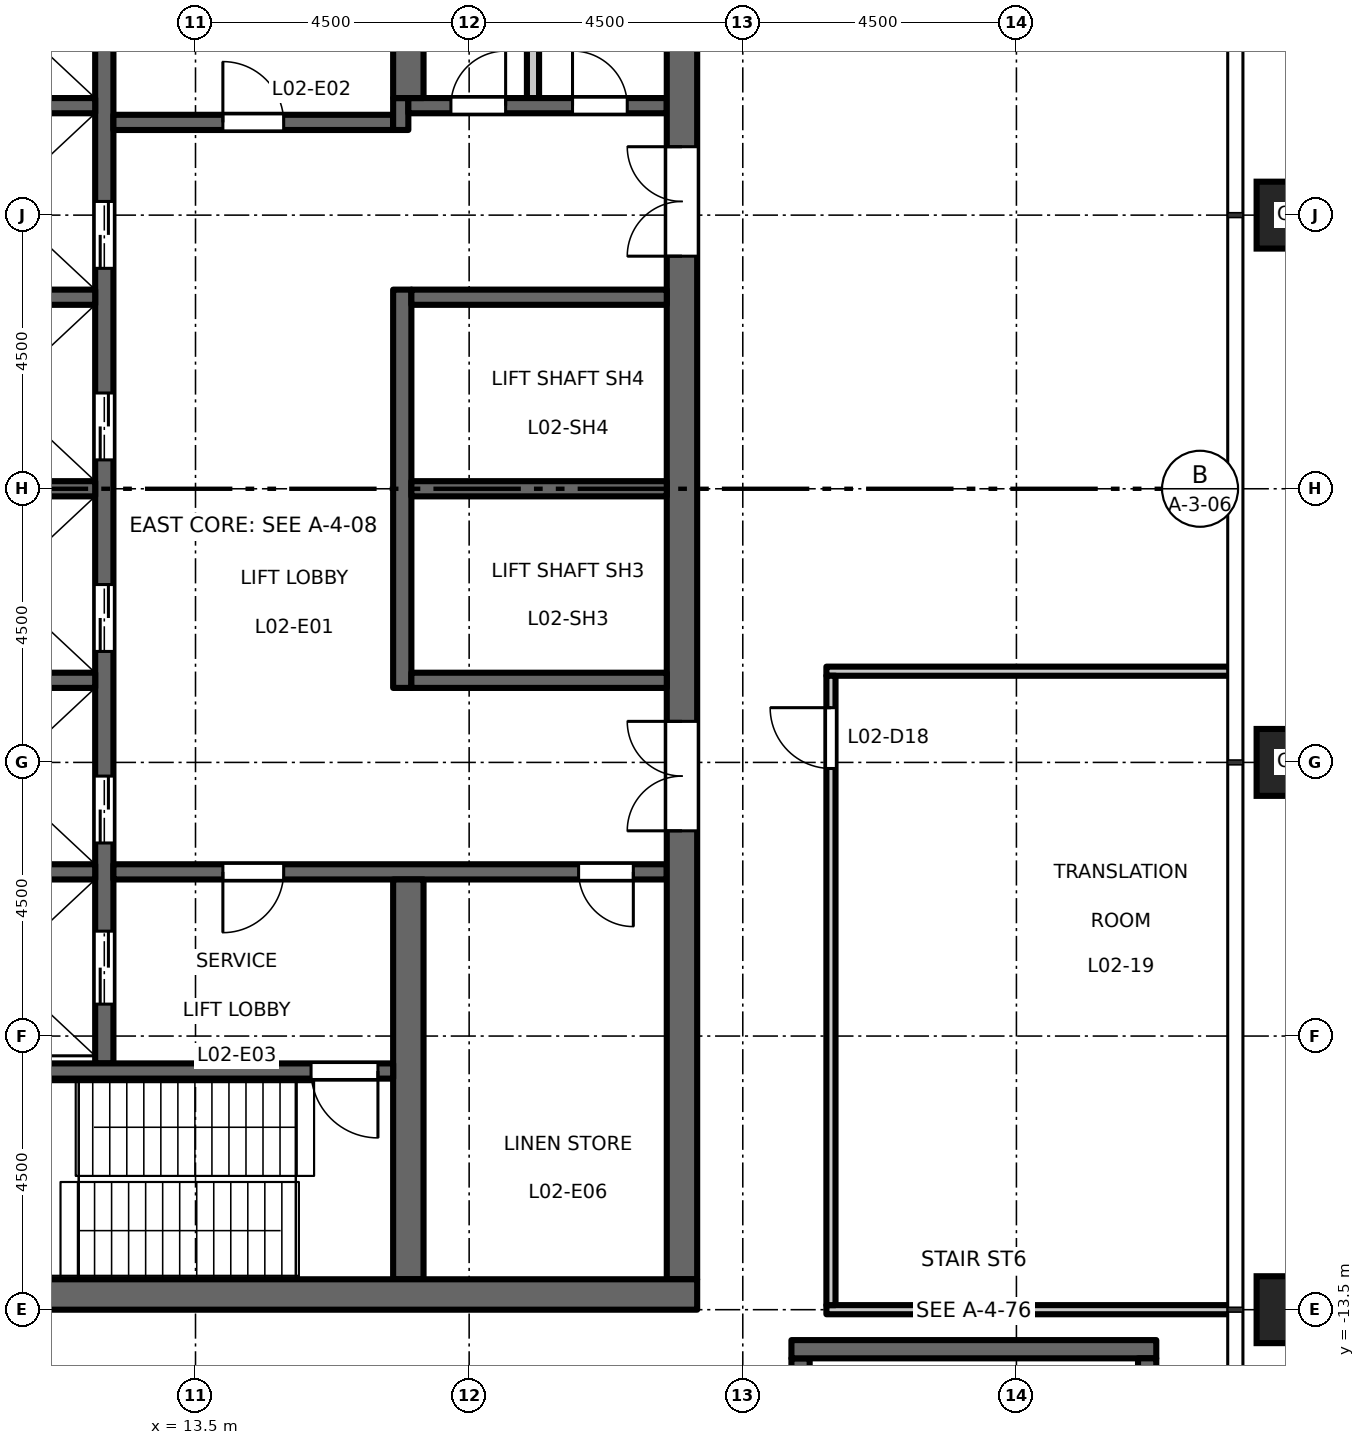
"""IFC4 building model, lengths in metres.
Left out: names, types, materials, properties, quantities, classifications, styles, units other than length and angle.
Written with IfcOpenShell. Run it as: python <this file> out.ifc"""

import sys

from ifc_helpers import new_model, si_unit, direction, frame, frame_2d, origin, origin_2d, place, context, subcontext, project, spatial, rectangle, hollow_rectangle, extrude, element, fill, save


model = new_model("IFC4")
c1 = context("Model", 3, precision=1e-05, world=origin(), true_north=direction((0.0, 1.0)))
c2 = subcontext(c1, "Body", "Model", "MODEL_VIEW")
j1 = project(units=[si_unit("LENGTHUNIT", "METRE"), si_unit("PLANEANGLEUNIT", "RADIAN")], contexts=[c1])
p1 = place(None, origin())
s1 = spatial("IfcSite", under=j1, at=p1, CompositionType="ELEMENT")
p2 = place(p1, origin())
s2 = spatial("IfcBuilding", under=s1, at=p2, CompositionType="ELEMENT")
p3 = place(p2, frame((0.0, 0.0, 12.2)))
s3 = spatial("IfcBuildingStorey", under=s2, at=p3, CompositionType="ELEMENT", Elevation=12.2)
for number, where, z_axis, x_axis in (
    (1, (31.5, -13.5, 0.0), (0.0, 0.0, 1.0), (1.0, 0.0, 0.0)),
    (2, (31.5, -4.5, 0.0), (0.0, 0.0, 1.0), (1.0, 0.0, 0.0)),
    (3, (31.5, 4.5, 0.0), (0.0, 0.0, 1.0), (1.0, 0.0, 0.0)),
):
    element("IfcColumn", number, at=place(p3, frame(where, z_axis=z_axis, x_axis=x_axis)), inside=s3, PredefinedType="COLUMN", context=c2, shape_type="SweptSolid", body=[
        extrude(hollow_rectangle(XDim=1.1, YDim=1.1, WallThickness=0.07, at=origin_2d()), origin(), (0.0, 0.0, 1.0), 5.0),
    ])
p4 = place(p3, frame((12.0, -9.45, 0.0), z_axis=(0.0, 0.0, 1.0), x_axis=(0.0, 1.0, 0.0)))
e4 = element("IfcWall", 4, at=p4, inside=s3, PredefinedType="SHEAR", context=c2, shape_type="SweptSolid", body=[
    extrude(rectangle(XDim=18.9, YDim=0.3, at=frame_2d((9.45, 0.0))), origin(), (0.0, 0.0, 1.0), 4.85),
])
p5 = place(p4, frame((3.625, 0.0, 0.0)))
e5 = element("IfcOpeningElement", 5, at=p5, cuts=e4, PredefinedType="OPENING", context=c2, shape_type="SweptSolid", body=[
    extrude(rectangle(XDim=1.1, YDim=2.1, at=frame_2d((0.55, 1.05))), frame((0.0, 0.16, 0.0), z_axis=(0.0, -1.0, 0.0), x_axis=(1.0, 0.0, 0.0)), (0.0, 0.0, 1.0), 0.32),
])
p6 = place(p4, frame((6.775, 0.0, 0.0)))
e6 = element("IfcOpeningElement", 6, at=p6, cuts=e4, PredefinedType="OPENING", context=c2, shape_type="SweptSolid", body=[
    extrude(rectangle(XDim=1.1, YDim=2.1, at=frame_2d((0.55, 1.05))), frame((0.0, 0.16, 0.0), z_axis=(0.0, -1.0, 0.0), x_axis=(1.0, 0.0, 0.0)), (0.0, 0.0, 1.0), 0.32),
])
p7 = place(p4, frame((9.925, 0.0, 0.0)))
e7 = element("IfcOpeningElement", 7, at=p7, cuts=e4, PredefinedType="OPENING", context=c2, shape_type="SweptSolid", body=[
    extrude(rectangle(XDim=1.1, YDim=2.1, at=frame_2d((0.55, 1.05))), frame((0.0, 0.16, 0.0), z_axis=(0.0, -1.0, 0.0), x_axis=(1.0, 0.0, 0.0)), (0.0, 0.0, 1.0), 0.32),
])
p8 = place(p4, frame((13.075, 0.0, 0.0)))
e8 = element("IfcOpeningElement", 8, at=p8, cuts=e4, PredefinedType="OPENING", context=c2, shape_type="SweptSolid", body=[
    extrude(rectangle(XDim=1.1, YDim=2.1, at=frame_2d((0.55, 1.05))), frame((0.0, 0.16, 0.0), z_axis=(0.0, -1.0, 0.0), x_axis=(1.0, 0.0, 0.0)), (0.0, 0.0, 1.0), 0.32),
])
p9 = place(p4, frame((16.725, 0.0, 0.0)))
e9 = element("IfcOpeningElement", 9, at=p9, cuts=e4, PredefinedType="OPENING", context=c2, shape_type="SweptSolid", body=[
    extrude(rectangle(XDim=1.2, YDim=2.1, at=frame_2d((0.6, 1.05))), frame((0.0, 0.16, 0.0), z_axis=(0.0, -1.0, 0.0), x_axis=(1.0, 0.0, 0.0)), (0.0, 0.0, 1.0), 0.32),
])
p10 = place(p4, frame((0.975, 0.0, 0.0)))
e10 = element("IfcOpeningElement", 10, at=p10, cuts=e4, PredefinedType="OPENING", context=c2, shape_type="SweptSolid", body=[
    extrude(rectangle(XDim=1.2, YDim=2.1, at=frame_2d((0.6, 1.05))), frame((0.0, 0.16, 0.0), z_axis=(0.0, -1.0, 0.0), x_axis=(1.0, 0.0, 0.0)), (0.0, 0.0, 1.0), 0.32),
])
p11 = place(p3, frame((12.15, 6.025, 0.0), z_axis=(0.0, 0.0, 1.0), x_axis=(1.0, 0.0, 0.0)))
e11 = element("IfcWall", 11, at=p11, inside=s3, PredefinedType="SHEAR", context=c2, shape_type="SweptSolid", body=[
    extrude(rectangle(XDim=4.6, YDim=0.25, at=frame_2d((2.3, 0.0))), origin(), (0.0, 0.0, 1.0), 4.85),
])
p12 = place(p11, frame((1.8, 0.0, 0.0)))
e12 = element("IfcOpeningElement", 12, at=p12, cuts=e11, PredefinedType="OPENING", context=c2, shape_type="SweptSolid", body=[
    extrude(rectangle(XDim=1.0, YDim=2.1, at=frame_2d((0.5, 1.05))), frame((0.0, 0.135, 0.0), z_axis=(0.0, -1.0, 0.0), x_axis=(1.0, 0.0, 0.0)), (0.0, 0.0, 1.0), 0.27),
])
p13 = place(p3, frame((16.875, 5.9, 0.0), z_axis=(0.0, 0.0, 1.0), x_axis=(0.0, 1.0, 0.0)))
e13 = element("IfcWall", 13, at=p13, inside=s3, PredefinedType="SHEAR", context=c2, shape_type="SweptSolid", body=[
    extrude(rectangle(XDim=0.525, YDim=0.25, at=frame_2d((0.263, 0.0))), origin(), (0.0, 0.0, 1.0), 4.85),
])
p14 = place(p3, frame((17.0, 6.3, 0.0), z_axis=(0.0, 0.0, 1.0), x_axis=(1.0, 0.0, 0.0)))
e14 = element("IfcWall", 14, at=p14, inside=s3, PredefinedType="SHEAR", context=c2, shape_type="SweptSolid", body=[
    extrude(rectangle(XDim=4.25, YDim=0.25, at=frame_2d((2.125, 0.0))), origin(), (0.0, 0.0, 1.0), 4.85),
])
p15 = place(p14, frame((0.7, 0.0, 0.0)))
e15 = element("IfcOpeningElement", 15, at=p15, cuts=e14, PredefinedType="OPENING", context=c2, shape_type="SweptSolid", body=[
    extrude(rectangle(XDim=0.9, YDim=2.1, at=frame_2d((0.45, 1.05))), frame((0.0, 0.135, 0.0), z_axis=(0.0, -1.0, 0.0), x_axis=(1.0, 0.0, 0.0)), (0.0, 0.0, 1.0), 0.27),
])
p16 = place(p14, frame((2.7, 0.0, 0.0)))
e16 = element("IfcOpeningElement", 16, at=p16, cuts=e14, PredefinedType="OPENING", context=c2, shape_type="SweptSolid", body=[
    extrude(rectangle(XDim=0.9, YDim=2.1, at=frame_2d((0.45, 1.05))), frame((0.0, 0.135, 0.0), z_axis=(0.0, -1.0, 0.0), x_axis=(1.0, 0.0, 0.0)), (0.0, 0.0, 1.0), 0.27),
])
p17 = place(p3, frame((12.15, -6.3, 0.0), z_axis=(0.0, 0.0, 1.0), x_axis=(1.0, 0.0, 0.0)))
e17 = element("IfcWall", 17, at=p17, inside=s3, PredefinedType="SHEAR", context=c2, shape_type="SweptSolid", body=[
    extrude(rectangle(XDim=9.1, YDim=0.25, at=frame_2d((4.55, 0.0))), origin(), (0.0, 0.0, 1.0), 4.85),
])
p18 = place(p17, frame((1.8, 0.0, 0.0)))
e18 = element("IfcOpeningElement", 18, at=p18, cuts=e17, PredefinedType="OPENING", context=c2, shape_type="SweptSolid", body=[
    extrude(rectangle(XDim=1.0, YDim=2.1, at=frame_2d((0.5, 1.05))), frame((0.0, 0.135, 0.0), z_axis=(0.0, -1.0, 0.0), x_axis=(1.0, 0.0, 0.0)), (0.0, 0.0, 1.0), 0.27),
])
p19 = place(p17, frame((7.65, 0.0, 0.0)))
e19 = element("IfcOpeningElement", 19, at=p19, cuts=e17, PredefinedType="OPENING", context=c2, shape_type="SweptSolid", body=[
    extrude(rectangle(XDim=0.9, YDim=2.1, at=frame_2d((0.45, 1.05))), frame((0.0, 0.135, 0.0), z_axis=(0.0, -1.0, 0.0), x_axis=(1.0, 0.0, 0.0)), (0.0, 0.0, 1.0), 0.27),
])
p20 = place(p3, frame((21.5, -13.0, 0.0), z_axis=(0.0, 0.0, 1.0), x_axis=(0.0, 1.0, 0.0)))
e20 = element("IfcWall", 20, at=p20, inside=s3, PredefinedType="SHEAR", context=c2, shape_type="SweptSolid", body=[
    extrude(rectangle(XDim=26.0, YDim=0.5, at=frame_2d((13.0, 0.0))), origin(), (0.0, 0.0, 1.0), 4.85),
])
p21 = place(p20, frame((16.825, 0.0, 0.0)))
e21 = element("IfcOpeningElement", 21, at=p21, cuts=e20, PredefinedType="OPENING", context=c2, shape_type="SweptSolid", body=[
    extrude(rectangle(XDim=1.8, YDim=2.1, at=frame_2d((0.9, 1.05))), frame((0.0, 0.26, 0.0), z_axis=(0.0, -1.0, 0.0), x_axis=(1.0, 0.0, 0.0)), (0.0, 0.0, 1.0), 0.52),
])
p22 = place(p20, frame((7.375, 0.0, 0.0)))
e22 = element("IfcOpeningElement", 22, at=p22, cuts=e20, PredefinedType="OPENING", context=c2, shape_type="SweptSolid", body=[
    extrude(rectangle(XDim=1.8, YDim=2.1, at=frame_2d((0.9, 1.05))), frame((0.0, 0.26, 0.0), z_axis=(0.0, -1.0, 0.0), x_axis=(1.0, 0.0, 0.0)), (0.0, 0.0, 1.0), 0.52),
])
p23 = place(p3, frame((19.05, 6.425, 0.0), z_axis=(0.0, 0.0, 1.0), x_axis=(0.0, 1.0, 0.0)))
e23 = element("IfcWall", 23, at=p23, inside=s3, PredefinedType="PARTITIONING", context=c2, shape_type="SweptSolid", body=[
    extrude(rectangle(XDim=6.575, YDim=0.2, at=frame_2d((3.288, 0.0))), origin(), (0.0, 0.0, 1.0), 4.85),
])
p24 = place(p3, frame((16.9, -3.275, 0.0), z_axis=(0.0, 0.0, 1.0), x_axis=(0.0, 1.0, 0.0)))
e24 = element("IfcWall", 24, at=p24, inside=s3, PredefinedType="SHEAR", context=c2, shape_type="SweptSolid", body=[
    extrude(rectangle(XDim=6.55, YDim=0.3, at=frame_2d((3.275, 0.0))), origin(), (0.0, 0.0, 1.0), 4.85),
])
for number, where, z_axis, x_axis in (
    (25, (17.05, 0.0, 0.0), (0.0, 0.0, 1.0), (1.0, 0.0, 0.0)),
    (26, (17.05, 3.15, 0.0), (0.0, 0.0, 1.0), (1.0, 0.0, 0.0)),
    (27, (17.05, -3.15, 0.0), (0.0, 0.0, 1.0), (1.0, 0.0, 0.0)),
):
    element("IfcWall", number, at=place(p3, frame(where, z_axis=z_axis, x_axis=x_axis)), inside=s3, PredefinedType="SHEAR", context=c2, shape_type="SweptSolid", body=[
        extrude(rectangle(XDim=4.2, YDim=0.25, at=frame_2d((2.1, 0.0))), origin(), (0.0, 0.0, 1.0), 4.85),
    ])
for number, where, z_axis, x_axis in (
    (28, (17.0, 6.425, 0.0), (0.0, 0.0, 1.0), (0.0, 1.0, 0.0)),
    (29, (17.0, -13.0, 0.0), (0.0, 0.0, 1.0), (0.0, 1.0, 0.0)),
):
    element("IfcWall", number, at=place(p3, frame(where, z_axis=z_axis, x_axis=x_axis)), inside=s3, PredefinedType="SHEAR", context=c2, shape_type="SweptSolid", body=[
        extrude(rectangle(XDim=6.575, YDim=0.5, at=frame_2d((3.288, 0.0))), origin(), (0.0, 0.0, 1.0), 4.85),
    ])
for number, where, z_axis, x_axis in (
    (30, (8.75, 0.0, 0.0), (0.0, 0.0, 1.0), (1.0, 0.0, 0.0)),
    (31, (8.75, 3.15, 0.0), (0.0, 0.0, 1.0), (1.0, 0.0, 0.0)),
    (32, (8.75, 6.3, 0.0), (0.0, 0.0, 1.0), (1.0, 0.0, 0.0)),
    (33, (8.75, -3.15, 0.0), (0.0, 0.0, 1.0), (1.0, 0.0, 0.0)),
    (34, (8.75, -6.3, 0.0), (0.0, 0.0, 1.0), (1.0, 0.0, 0.0)),
):
    element("IfcWall", number, at=place(p3, frame(where, z_axis=z_axis, x_axis=x_axis)), inside=s3, PredefinedType="SHEAR", context=c2, shape_type="SweptSolid", body=[
        extrude(rectangle(XDim=3.1, YDim=0.25, at=frame_2d((1.55, 0.0))), origin(), (0.0, 0.0, 1.0), 4.85),
    ])
p25 = place(p3, frame((8.75, -9.575, 0.0), z_axis=(0.0, 0.0, 1.0), x_axis=(1.0, 0.0, 0.0)))
e35 = element("IfcWall", 35, at=p25, inside=s3, PredefinedType="SHEAR", context=c2, shape_type="SweptSolid", body=[
    extrude(rectangle(XDim=8.0, YDim=0.25, at=frame_2d((4.0, 0.0))), origin(), (0.0, 0.0, 1.0), 4.85),
])
p26 = place(p25, frame((6.65, 0.0, 0.0)))
e36 = element("IfcOpeningElement", 36, at=p26, cuts=e35, PredefinedType="OPENING", context=c2, shape_type="SweptSolid", body=[
    extrude(rectangle(XDim=1.1, YDim=2.1, at=frame_2d((0.55, 1.05))), frame((0.0, 0.135, 0.0), z_axis=(0.0, -1.0, 0.0), x_axis=(1.0, 0.0, 0.0)), (0.0, 0.0, 1.0), 0.27),
])
p27 = place(p3, frame((8.25, -13.25, 0.0), z_axis=(0.0, 0.0, 1.0), x_axis=(1.0, 0.0, 0.0)))
e37 = element("IfcWall", 37, at=p27, inside=s3, PredefinedType="SHEAR", context=c2, shape_type="SweptSolid", body=[
    extrude(rectangle(XDim=13.5, YDim=0.5, at=frame_2d((6.75, 0.0))), origin(), (0.0, 0.0, 1.0), 4.85),
])
p28 = place(p3, frame((23.45, -14.3, 0.0), z_axis=(0.0, 0.0, 1.0), x_axis=(0.0, -1.0, 0.0)))
e38 = element("IfcWall", 38, at=p28, inside=s3, PredefinedType="SHEAR", context=c2, shape_type="SweptSolid", body=[
    extrude(rectangle(XDim=10.2, YDim=0.3, at=frame_2d((5.1, 0.0))), origin(), (0.0, 0.0, 1.0), 4.85),
])
p29 = place(p28, frame((0.2, 0.0, 0.0)))
e39 = element("IfcOpeningElement", 39, at=p29, cuts=e38, PredefinedType="OPENING", context=c2, shape_type="SweptSolid", body=[
    extrude(rectangle(XDim=1.8, YDim=2.1, at=frame_2d((0.9, 1.05))), frame((0.0, 0.16, 0.0), z_axis=(0.0, -1.0, 0.0), x_axis=(1.0, 0.0, 0.0)), (0.0, 0.0, 1.0), 0.32),
])
p30 = place(p3, frame((29.3, -14.15, 0.0), z_axis=(0.0, 0.0, 1.0), x_axis=(-1.0, 0.0, 0.0)))
e40 = element("IfcWall", 40, at=p30, inside=s3, PredefinedType="SHEAR", context=c2, shape_type="SweptSolid", body=[
    extrude(rectangle(XDim=6.0, YDim=0.3, at=frame_2d((3.0, 0.0))), origin(), (0.0, 0.0, 1.0), 4.85),
])
p31 = place(p3, frame((29.15, -14.3, 0.0), z_axis=(0.0, 0.0, 1.0), x_axis=(0.0, -1.0, 0.0)))
e41 = element("IfcWall", 41, at=p31, inside=s3, PredefinedType="SHEAR", context=c2, shape_type="SweptSolid", body=[
    extrude(rectangle(XDim=10.2, YDim=0.3, at=frame_2d((5.1, 0.0))), origin(), (0.0, 0.0, 1.0), 4.85),
])
p32 = place(p3, frame((23.875, -13.5, 0.0), z_axis=(0.0, 0.0, 1.0), x_axis=(1.0, 0.0, 0.0)))
e42 = element("IfcWall", 42, at=p32, inside=s3, PredefinedType="PARTITIONING", context=c2, shape_type="SweptSolid", body=[
    extrude(rectangle(XDim=6.635, YDim=0.15, at=frame_2d((3.317, 0.0))), origin(), (0.0, 0.0, 1.0), 3.85),
])
p33 = place(p3, frame((23.875, -3.0, 0.0), z_axis=(0.0, 0.0, 1.0), x_axis=(1.0, 0.0, 0.0)))
e43 = element("IfcWall", 43, at=p33, inside=s3, PredefinedType="PARTITIONING", context=c2, shape_type="SweptSolid", body=[
    extrude(rectangle(XDim=6.635, YDim=0.15, at=frame_2d((3.317, 0.0))), origin(), (0.0, 0.0, 1.0), 4.85),
])
p34 = place(p3, frame((23.95, -13.425, 0.0), z_axis=(0.0, 0.0, 1.0), x_axis=(0.0, 1.0, 0.0)))
e44 = element("IfcWall", 44, at=p34, inside=s3, PredefinedType="PARTITIONING", context=c2, shape_type="SweptSolid", body=[
    extrude(rectangle(XDim=10.35, YDim=0.15, at=frame_2d((5.175, 0.0))), origin(), (0.0, 0.0, 1.0), 4.85),
])
p35 = place(p34, frame((8.825, 0.0, 0.0)))
e45 = element("IfcOpeningElement", 45, at=p35, cuts=e44, PredefinedType="OPENING", context=c2, shape_type="SweptSolid", body=[
    extrude(rectangle(XDim=1.0, YDim=2.1, at=frame_2d((0.5, 1.05))), frame((0.0, 0.085, 0.0), z_axis=(0.0, -1.0, 0.0), x_axis=(1.0, 0.0, 0.0)), (0.0, 0.0, 1.0), 0.17),
])
p36 = place(p12, origin())
e46 = element("IfcDoor", 46, at=p36, inside=s3, OperationType="SINGLE_SWING_RIGHT", PredefinedType="DOOR", context=c2, shape_type="SweptSolid", body=[
    extrude(rectangle(XDim=1.0, YDim=2.1, at=frame_2d((0.5, 1.05))), frame((0.0, 0.025, 0.0), z_axis=(0.0, -1.0, 0.0), x_axis=(1.0, 0.0, 0.0)), (0.0, 0.0, 1.0), 0.05),
])
fill(e12, e46)
p37 = place(p18, origin())
e47 = element("IfcDoor", 47, at=p37, inside=s3, OperationType="SINGLE_SWING_LEFT", PredefinedType="DOOR", context=c2, shape_type="SweptSolid", body=[
    extrude(rectangle(XDim=1.0, YDim=2.1, at=frame_2d((0.5, 1.05))), frame((0.0, 0.025, 0.0), z_axis=(0.0, -1.0, 0.0), x_axis=(1.0, 0.0, 0.0)), (0.0, 0.0, 1.0), 0.05),
])
fill(e18, e47)
p38 = place(p26, origin())
e48 = element("IfcDoor", 48, at=p38, inside=s3, OperationType="SINGLE_SWING_RIGHT", PredefinedType="DOOR", context=c2, shape_type="SweptSolid", body=[
    extrude(rectangle(XDim=1.1, YDim=2.1, at=frame_2d((0.55, 1.05))), frame((0.0, 0.025, 0.0), z_axis=(0.0, -1.0, 0.0), x_axis=(1.0, 0.0, 0.0)), (0.0, 0.0, 1.0), 0.05),
])
fill(e36, e48)
p39 = place(p21, origin())
e49 = element("IfcDoor", 49, at=p39, inside=s3, OperationType="DOUBLE_DOOR_DOUBLE_SWING", PredefinedType="DOOR", context=c2, shape_type="SweptSolid", body=[
    extrude(rectangle(XDim=1.8, YDim=2.1, at=frame_2d((0.9, 1.05))), frame((0.0, 0.025, 0.0), z_axis=(0.0, -1.0, 0.0), x_axis=(1.0, 0.0, 0.0)), (0.0, 0.0, 1.0), 0.05),
])
fill(e21, e49)
p40 = place(p22, origin())
e50 = element("IfcDoor", 50, at=p40, inside=s3, OperationType="DOUBLE_DOOR_DOUBLE_SWING", PredefinedType="DOOR", context=c2, shape_type="SweptSolid", body=[
    extrude(rectangle(XDim=1.8, YDim=2.1, at=frame_2d((0.9, 1.05))), frame((0.0, 0.025, 0.0), z_axis=(0.0, -1.0, 0.0), x_axis=(1.0, 0.0, 0.0)), (0.0, 0.0, 1.0), 0.05),
])
fill(e22, e50)
p41 = place(p5, origin())
e51 = element("IfcDoor", 51, at=p41, inside=s3, OperationType="DOUBLE_DOOR_SLIDING", PredefinedType="DOOR", context=c2, shape_type="SweptSolid", body=[
    extrude(rectangle(XDim=1.1, YDim=2.1, at=frame_2d((0.55, 1.05))), frame((0.0, 0.025, 0.0), z_axis=(0.0, -1.0, 0.0), x_axis=(1.0, 0.0, 0.0)), (0.0, 0.0, 1.0), 0.05),
])
fill(e5, e51)
p42 = place(p6, origin())
e52 = element("IfcDoor", 52, at=p42, inside=s3, OperationType="DOUBLE_DOOR_SLIDING", PredefinedType="DOOR", context=c2, shape_type="SweptSolid", body=[
    extrude(rectangle(XDim=1.1, YDim=2.1, at=frame_2d((0.55, 1.05))), frame((0.0, 0.025, 0.0), z_axis=(0.0, -1.0, 0.0), x_axis=(1.0, 0.0, 0.0)), (0.0, 0.0, 1.0), 0.05),
])
fill(e6, e52)
p43 = place(p7, origin())
e53 = element("IfcDoor", 53, at=p43, inside=s3, OperationType="DOUBLE_DOOR_SLIDING", PredefinedType="DOOR", context=c2, shape_type="SweptSolid", body=[
    extrude(rectangle(XDim=1.1, YDim=2.1, at=frame_2d((0.55, 1.05))), frame((0.0, 0.025, 0.0), z_axis=(0.0, -1.0, 0.0), x_axis=(1.0, 0.0, 0.0)), (0.0, 0.0, 1.0), 0.05),
])
fill(e7, e53)
p44 = place(p8, origin())
e54 = element("IfcDoor", 54, at=p44, inside=s3, OperationType="DOUBLE_DOOR_SLIDING", PredefinedType="DOOR", context=c2, shape_type="SweptSolid", body=[
    extrude(rectangle(XDim=1.1, YDim=2.1, at=frame_2d((0.55, 1.05))), frame((0.0, 0.025, 0.0), z_axis=(0.0, -1.0, 0.0), x_axis=(1.0, 0.0, 0.0)), (0.0, 0.0, 1.0), 0.05),
])
fill(e8, e54)
p45 = place(p10, origin())
e55 = element("IfcDoor", 55, at=p45, inside=s3, OperationType="DOUBLE_DOOR_SLIDING", PredefinedType="DOOR", context=c2, shape_type="SweptSolid", body=[
    extrude(rectangle(XDim=1.2, YDim=2.1, at=frame_2d((0.6, 1.05))), frame((0.0, 0.025, 0.0), z_axis=(0.0, -1.0, 0.0), x_axis=(1.0, 0.0, 0.0)), (0.0, 0.0, 1.0), 0.05),
])
fill(e10, e55)
p46 = place(p15, origin())
e56 = element("IfcDoor", 56, at=p46, inside=s3, OperationType="SINGLE_SWING_LEFT", PredefinedType="DOOR", context=c2, shape_type="SweptSolid", body=[
    extrude(rectangle(XDim=0.9, YDim=2.1, at=frame_2d((0.45, 1.05))), frame((0.0, 0.025, 0.0), z_axis=(0.0, -1.0, 0.0), x_axis=(1.0, 0.0, 0.0)), (0.0, 0.0, 1.0), 0.05),
])
fill(e15, e56)
p47 = place(p16, origin())
e57 = element("IfcDoor", 57, at=p47, inside=s3, OperationType="SINGLE_SWING_RIGHT", PredefinedType="DOOR", context=c2, shape_type="SweptSolid", body=[
    extrude(rectangle(XDim=0.9, YDim=2.1, at=frame_2d((0.45, 1.05))), frame((0.0, 0.025, 0.0), z_axis=(0.0, -1.0, 0.0), x_axis=(1.0, 0.0, 0.0)), (0.0, 0.0, 1.0), 0.05),
])
fill(e16, e57)
p48 = place(p19, origin())
e58 = element("IfcDoor", 58, at=p48, inside=s3, OperationType="SINGLE_SWING_RIGHT", PredefinedType="DOOR", context=c2, shape_type="SweptSolid", body=[
    extrude(rectangle(XDim=0.9, YDim=2.1, at=frame_2d((0.45, 1.05))), frame((0.0, 0.025, 0.0), z_axis=(0.0, -1.0, 0.0), x_axis=(1.0, 0.0, 0.0)), (0.0, 0.0, 1.0), 0.05),
])
fill(e19, e58)
p49 = place(p35, origin())
e59 = element("IfcDoor", 59, at=p49, inside=s3, OperationType="SINGLE_SWING_RIGHT", PredefinedType="DOOR", context=c2, shape_type="SweptSolid", body=[
    extrude(rectangle(XDim=1.0, YDim=2.1, at=frame_2d((0.5, 1.05))), frame((0.0, 0.025, 0.0), z_axis=(0.0, -1.0, 0.0), x_axis=(1.0, 0.0, 0.0)), (0.0, 0.0, 1.0), 0.05),
])
fill(e45, e59)
save(model, sys.argv[1])
